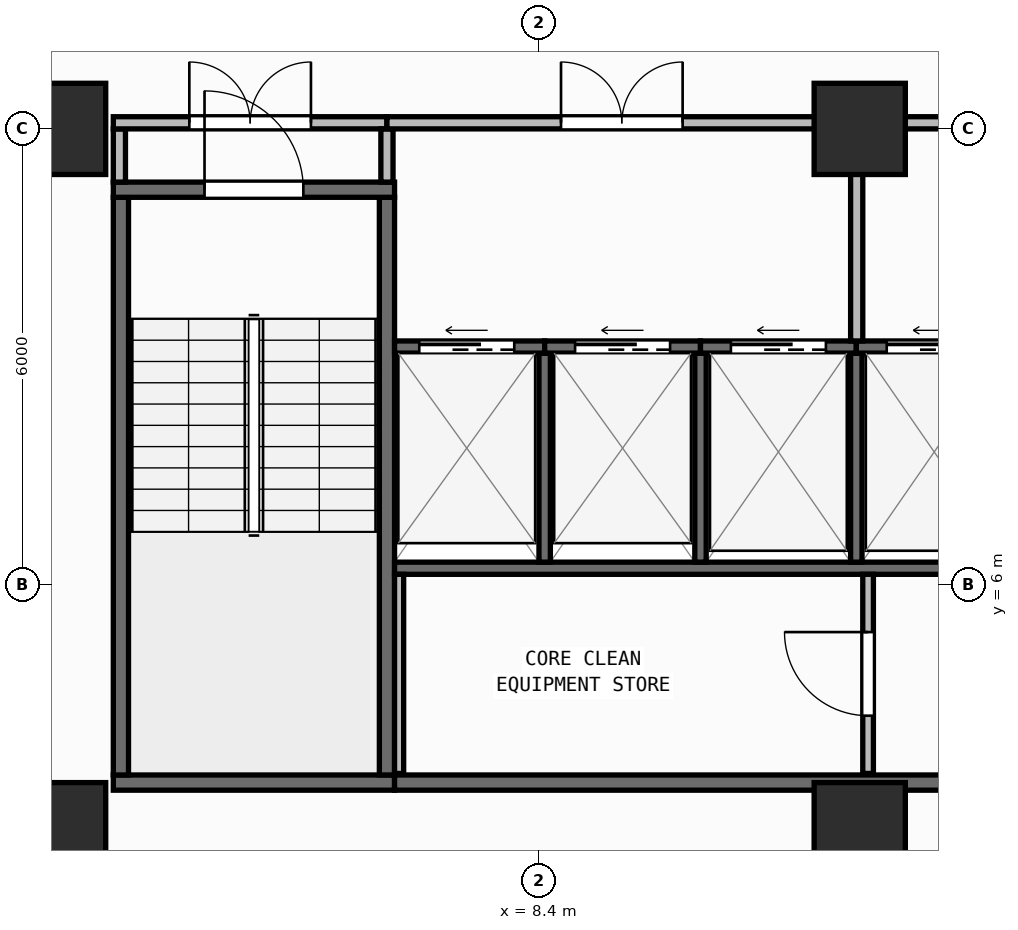
"""IFC4 building model, lengths in metres.
Left out: names, types, materials, properties, quantities, classifications, styles, units other than length and angle.
Written with IfcOpenShell. Run it as: python <this file> out.ifc"""

import sys

from ifc_helpers import new_model, si_unit, direction, frame, frame_2d, origin, origin_2d, place, context, subcontext, project, spatial, rectangle, extrude, element, fill, save


model = new_model("IFC4")
c1 = context("Model", 3, precision=1e-05, world=origin(), true_north=direction((0.0, 1.0)))
c2 = subcontext(c1, "Body", "Model", "MODEL_VIEW")
j1 = project(units=[si_unit("LENGTHUNIT", "METRE"), si_unit("PLANEANGLEUNIT", "RADIAN")], contexts=[c1])
p1 = place(None, origin())
s1 = spatial("IfcSite", under=j1, at=p1, CompositionType="ELEMENT")
p2 = place(p1, origin())
s2 = spatial("IfcBuilding", under=s1, at=p2, CompositionType="ELEMENT")
p3 = place(p2, frame((0.0, 0.0, 127.05)))
s3 = spatial("IfcBuildingStorey", under=s2, at=p3, CompositionType="ELEMENT", Elevation=127.05)
for number, where, z_axis, x_axis in (
    (1, (2.1, 2.8, 0.0), (0.0, 0.0, 1.0), (1.0, 0.0, 0.0)),
    (2, (12.62, 2.8, 0.0), (0.0, 0.0, 1.0), (1.0, 0.0, 0.0)),
    (3, (2.1, 12.0, 0.0), (0.0, 0.0, 1.0), (1.0, 0.0, 0.0)),
    (4, (12.62, 12.0, 0.0), (0.0, 0.0, 1.0), (1.0, 0.0, 0.0)),
):
    element("IfcColumn", number, at=place(p3, frame(where, z_axis=z_axis, x_axis=x_axis)), inside=s3, PredefinedType="COLUMN", context=c2, shape_type="SweptSolid", body=[
        extrude(rectangle(XDim=1.2, YDim=1.2, at=origin_2d()), origin(), (0.0, 0.0, 1.0), 3.95),
    ])
p4 = place(p3, frame((2.76, 0.173, 0.0), z_axis=(0.0, 0.0, 1.0), x_axis=(0.996857931723, 0.079210251617, 0.0)))
e5 = element("IfcWall", 5, at=p4, inside=s3, PredefinedType="STANDARD", context=c2, shape_type="SweptSolid", body=[
    extrude(rectangle(XDim=51.442, YDim=0.26, at=frame_2d((25.721, 0.0))), origin(), (0.0, 0.0, 1.0), 3.71),
])
p5 = place(p4, frame((24.521, 0.0, 0.9)))
e6 = element("IfcOpeningElement", 6, at=p5, cuts=e5, PredefinedType="OPENING", context=c2, shape_type="SweptSolid", body=[
    extrude(rectangle(XDim=2.4, YDim=1.65, at=frame_2d((1.2, 0.825))), frame((0.0, 0.14, 0.0), z_axis=(0.0, -1.0, 0.0), x_axis=(1.0, 0.0, 0.0)), (0.0, 0.0, 1.0), 0.28),
])
p6 = place(p3, frame((2.8, 3.4, 0.0), z_axis=(0.0, 0.0, 1.0), x_axis=(1.0, 0.0, 0.0)))
e7 = element("IfcWall", 7, at=p6, inside=s3, PredefinedType="SHEAR", context=c2, shape_type="SweptSolid", body=[
    extrude(rectangle(XDim=3.7, YDim=0.2, at=frame_2d((1.85, 0.0))), origin(), (0.0, 0.0, 1.0), 3.71),
])
for number, where, z_axis, x_axis in (
    (8, (2.9, 3.5, 0.0), (0.0, 0.0, 1.0), (0.0, 1.0, 0.0)),
    (9, (6.4, 3.5, 0.0), (0.0, 0.0, 1.0), (0.0, 1.0, 0.0)),
):
    element("IfcWall", number, at=place(p3, frame(where, z_axis=z_axis, x_axis=x_axis)), inside=s3, PredefinedType="SHEAR", context=c2, shape_type="SweptSolid", body=[
        extrude(rectangle(XDim=7.6, YDim=0.2, at=frame_2d((3.8, 0.0))), origin(), (0.0, 0.0, 1.0), 3.71),
    ])
p7 = place(p3, frame((2.8, 11.2, 0.0), z_axis=(0.0, 0.0, 1.0), x_axis=(1.0, 0.0, 0.0)))
e10 = element("IfcWall", 10, at=p7, inside=s3, PredefinedType="SHEAR", context=c2, shape_type="SweptSolid", body=[
    extrude(rectangle(XDim=3.7, YDim=0.2, at=frame_2d((1.85, 0.0))), origin(), (0.0, 0.0, 1.0), 3.71),
])
p8 = place(p7, frame((1.2, 0.0, 0.0)))
e11 = element("IfcOpeningElement", 11, at=p8, cuts=e10, PredefinedType="OPENING", context=c2, shape_type="SweptSolid", body=[
    extrude(rectangle(XDim=1.3, YDim=2.15, at=frame_2d((0.65, 1.075))), frame((0.0, 0.11, 0.0), z_axis=(0.0, -1.0, 0.0), x_axis=(1.0, 0.0, 0.0)), (0.0, 0.0, 1.0), 0.22),
])
p9 = place(p3, frame((6.5, 3.4, 0.0), z_axis=(0.0, 0.0, 1.0), x_axis=(1.0, 0.0, 0.0)))
e12 = element("IfcWall", 12, at=p9, inside=s3, PredefinedType="SHEAR", context=c2, shape_type="SweptSolid", body=[
    extrude(rectangle(XDim=13.7, YDim=0.2, at=frame_2d((6.85, 0.0))), origin(), (0.0, 0.0, 1.0), 3.71),
])
p10 = place(p3, frame((6.5, 6.22, 0.0), z_axis=(0.0, 0.0, 1.0), x_axis=(1.0, 0.0, 0.0)))
e13 = element("IfcWall", 13, at=p10, inside=s3, PredefinedType="SHEAR", context=c2, shape_type="SweptSolid", body=[
    extrude(rectangle(XDim=12.11, YDim=0.16, at=frame_2d((6.055, 0.0))), origin(), (0.0, 0.0, 1.0), 3.71),
])
for number, where, z_axis, x_axis in (
    (14, (8.475, 6.3, 0.0), (0.0, 0.0, 1.0), (0.0, 1.0, 0.0)),
    (15, (10.525, 6.3, 0.0), (0.0, 0.0, 1.0), (0.0, 1.0, 0.0)),
    (16, (12.575, 6.3, 0.0), (0.0, 0.0, 1.0), (0.0, 1.0, 0.0)),
):
    element("IfcWall", number, at=place(p3, frame(where, z_axis=z_axis, x_axis=x_axis)), inside=s3, PredefinedType="SHEAR", context=c2, shape_type="SweptSolid", body=[
        extrude(rectangle(XDim=2.75, YDim=0.15, at=frame_2d((1.375, 0.0))), origin(), (0.0, 0.0, 1.0), 3.71),
    ])
p11 = place(p3, frame((6.5, 9.13, 0.0), z_axis=(0.0, 0.0, 1.0), x_axis=(1.0, 0.0, 0.0)))
e17 = element("IfcWall", 17, at=p11, inside=s3, PredefinedType="SHEAR", context=c2, shape_type="SweptSolid", body=[
    extrude(rectangle(XDim=1.975, YDim=0.16, at=frame_2d((0.988, 0.0))), origin(), (0.0, 0.0, 1.0), 3.71),
])
p12 = place(p11, frame((0.325, 0.0, 0.0)))
e18 = element("IfcOpeningElement", 18, at=p12, cuts=e17, PredefinedType="OPENING", context=c2, shape_type="SweptSolid", body=[
    extrude(rectangle(XDim=1.25, YDim=2.15, at=frame_2d((0.625, 1.075))), frame((0.0, 0.09, 0.0), z_axis=(0.0, -1.0, 0.0), x_axis=(1.0, 0.0, 0.0)), (0.0, 0.0, 1.0), 0.18),
])
p13 = place(p3, frame((8.475, 9.13, 0.0), z_axis=(0.0, 0.0, 1.0), x_axis=(1.0, 0.0, 0.0)))
e19 = element("IfcWall", 19, at=p13, inside=s3, PredefinedType="SHEAR", context=c2, shape_type="SweptSolid", body=[
    extrude(rectangle(XDim=2.05, YDim=0.16, at=frame_2d((1.025, 0.0))), origin(), (0.0, 0.0, 1.0), 3.71),
])
p14 = place(p13, frame((0.4, 0.0, 0.0)))
e20 = element("IfcOpeningElement", 20, at=p14, cuts=e19, PredefinedType="OPENING", context=c2, shape_type="SweptSolid", body=[
    extrude(rectangle(XDim=1.25, YDim=2.15, at=frame_2d((0.625, 1.075))), frame((0.0, 0.09, 0.0), z_axis=(0.0, -1.0, 0.0), x_axis=(1.0, 0.0, 0.0)), (0.0, 0.0, 1.0), 0.18),
])
p15 = place(p3, frame((10.525, 9.13, 0.0), z_axis=(0.0, 0.0, 1.0), x_axis=(1.0, 0.0, 0.0)))
e21 = element("IfcWall", 21, at=p15, inside=s3, PredefinedType="SHEAR", context=c2, shape_type="SweptSolid", body=[
    extrude(rectangle(XDim=2.05, YDim=0.16, at=frame_2d((1.025, 0.0))), origin(), (0.0, 0.0, 1.0), 3.71),
])
p16 = place(p15, frame((0.4, 0.0, 0.0)))
e22 = element("IfcOpeningElement", 22, at=p16, cuts=e21, PredefinedType="OPENING", context=c2, shape_type="SweptSolid", body=[
    extrude(rectangle(XDim=1.25, YDim=2.15, at=frame_2d((0.625, 1.075))), frame((0.0, 0.09, 0.0), z_axis=(0.0, -1.0, 0.0), x_axis=(1.0, 0.0, 0.0)), (0.0, 0.0, 1.0), 0.18),
])
p17 = place(p3, frame((12.575, 9.13, 0.0), z_axis=(0.0, 0.0, 1.0), x_axis=(1.0, 0.0, 0.0)))
e23 = element("IfcWall", 23, at=p17, inside=s3, PredefinedType="SHEAR", context=c2, shape_type="SweptSolid", body=[
    extrude(rectangle(XDim=2.05, YDim=0.16, at=frame_2d((1.025, 0.0))), origin(), (0.0, 0.0, 1.0), 3.71),
])
p18 = place(p17, frame((0.4, 0.0, 0.0)))
e24 = element("IfcOpeningElement", 24, at=p18, cuts=e23, PredefinedType="OPENING", context=c2, shape_type="SweptSolid", body=[
    extrude(rectangle(XDim=1.25, YDim=2.15, at=frame_2d((0.625, 1.075))), frame((0.0, 0.09, 0.0), z_axis=(0.0, -1.0, 0.0), x_axis=(1.0, 0.0, 0.0)), (0.0, 0.0, 1.0), 0.18),
])
p19 = place(p3, frame((6.56, 3.52, 0.0), z_axis=(0.0, 0.0, 1.0), x_axis=(0.0, 1.0, 0.0)))
e25 = element("IfcWall", 25, at=p19, inside=s3, PredefinedType="PARTITIONING", context=c2, shape_type="SweptSolid", body=[
    extrude(rectangle(XDim=2.62, YDim=0.12, at=frame_2d((1.31, 0.0))), origin(), (0.0, 0.0, 1.0), 3.71),
])
p20 = place(p3, frame((12.73, 3.52, 0.0), z_axis=(0.0, 0.0, 1.0), x_axis=(0.0, 1.0, 0.0)))
e26 = element("IfcWall", 26, at=p20, inside=s3, PredefinedType="PARTITIONING", context=c2, shape_type="SweptSolid", body=[
    extrude(rectangle(XDim=2.62, YDim=0.14, at=frame_2d((1.31, 0.0))), origin(), (0.0, 0.0, 1.0), 3.71),
])
p21 = place(p20, frame((0.76, 0.0, 0.0)))
e27 = element("IfcOpeningElement", 27, at=p21, cuts=e26, PredefinedType="OPENING", context=c2, shape_type="SweptSolid", body=[
    extrude(rectangle(XDim=1.1, YDim=2.1, at=frame_2d((0.55, 1.05))), frame((0.0, 0.08, 0.0), z_axis=(0.0, -1.0, 0.0), x_axis=(1.0, 0.0, 0.0)), (0.0, 0.0, 1.0), 0.16),
])
p22 = place(p3, frame((2.88, 11.3, 0.0), z_axis=(0.0, 0.0, 1.0), x_axis=(0.0, 1.0, 0.0)))
e28 = element("IfcWall", 28, at=p22, inside=s3, PredefinedType="PARTITIONING", context=c2, shape_type="SweptSolid", body=[
    extrude(rectangle(XDim=0.7, YDim=0.16, at=frame_2d((0.35, 0.0))), origin(), (0.0, 0.0, 1.0), 3.71),
])
p23 = place(p3, frame((2.8, 12.08, 0.0), z_axis=(0.0, 0.0, 1.0), x_axis=(1.0, 0.0, 0.0)))
e29 = element("IfcWall", 29, at=p23, inside=s3, PredefinedType="PARTITIONING", context=c2, shape_type="SweptSolid", body=[
    extrude(rectangle(XDim=3.6, YDim=0.16, at=frame_2d((1.8, 0.0))), origin(), (0.0, 0.0, 1.0), 3.083),
])
p24 = place(p23, frame((1.0, 0.0, 0.0)))
e30 = element("IfcOpeningElement", 30, at=p24, cuts=e29, PredefinedType="OPENING", context=c2, shape_type="SweptSolid", body=[
    extrude(rectangle(XDim=1.6, YDim=2.05, at=frame_2d((0.8, 1.025))), frame((0.0, 0.09, 0.0), z_axis=(0.0, -1.0, 0.0), x_axis=(1.0, 0.0, 0.0)), (0.0, 0.0, 1.0), 0.18),
])
p25 = place(p3, frame((6.4, 11.3, 0.0), z_axis=(0.0, 0.0, 1.0), x_axis=(0.0, 1.0, 0.0)))
e31 = element("IfcWall", 31, at=p25, inside=s3, PredefinedType="PARTITIONING", context=c2, shape_type="SweptSolid", body=[
    extrude(rectangle(XDim=0.7, YDim=0.16, at=frame_2d((0.35, 0.0))), origin(), (0.0, 0.0, 1.0), 3.71),
])
p26 = place(p3, frame((6.4, 12.08, 0.0), z_axis=(0.0, 0.0, 1.0), x_axis=(1.0, 0.0, 0.0)))
e32 = element("IfcWall", 32, at=p26, inside=s3, PredefinedType="PARTITIONING", context=c2, shape_type="SweptSolid", body=[
    extrude(rectangle(XDim=6.18, YDim=0.16, at=frame_2d((3.09, 0.0))), origin(), (0.0, 0.0, 1.0), 3.083),
])
p27 = place(p26, frame((2.29, 0.0, 0.0)))
e33 = element("IfcOpeningElement", 33, at=p27, cuts=e32, PredefinedType="OPENING", context=c2, shape_type="SweptSolid", body=[
    extrude(rectangle(XDim=1.6, YDim=2.05, at=frame_2d((0.8, 1.025))), frame((0.0, 0.09, 0.0), z_axis=(0.0, -1.0, 0.0), x_axis=(1.0, 0.0, 0.0)), (0.0, 0.0, 1.0), 0.18),
])
p28 = place(p3, frame((12.58, 9.21, 0.0), z_axis=(0.0, 0.0, 1.0), x_axis=(0.0, 1.0, 0.0)))
e34 = element("IfcWall", 34, at=p28, inside=s3, PredefinedType="PARTITIONING", context=c2, shape_type="SweptSolid", body=[
    extrude(rectangle(XDim=2.79, YDim=0.16, at=frame_2d((1.395, 0.0))), origin(), (0.0, 0.0, 1.0), 3.71),
])
p29 = place(p3, frame((12.58, 12.08, 0.0), z_axis=(0.0, 0.0, 1.0), x_axis=(1.0, 0.0, 0.0)))
e35 = element("IfcWall", 35, at=p29, inside=s3, PredefinedType="PARTITIONING", context=c2, shape_type="SweptSolid", body=[
    extrude(rectangle(XDim=7.7, YDim=0.16, at=frame_2d((3.85, 0.0))), origin(), (0.0, 0.0, 1.0), 3.083),
])
p30 = place(p29, frame((3.05, 0.0, 0.0)))
e36 = element("IfcOpeningElement", 36, at=p30, cuts=e35, PredefinedType="OPENING", context=c2, shape_type="SweptSolid", body=[
    extrude(rectangle(XDim=1.6, YDim=2.05, at=frame_2d((0.8, 1.025))), frame((0.0, 0.09, 0.0), z_axis=(0.0, -1.0, 0.0), x_axis=(1.0, 0.0, 0.0)), (0.0, 0.0, 1.0), 0.18),
])
p31 = place(p8, origin())
e37 = element("IfcDoor", 37, at=p31, inside=s3, OperationType="SINGLE_SWING_LEFT", PredefinedType="DOOR", context=c2, shape_type="SweptSolid", body=[
    extrude(rectangle(XDim=1.3, YDim=2.15, at=frame_2d((0.65, 1.075))), frame((0.0, 0.025, 0.0), z_axis=(0.0, -1.0, 0.0), x_axis=(1.0, 0.0, 0.0)), (0.0, 0.0, 1.0), 0.05),
])
fill(e11, e37)
p32 = place(p12, origin())
e38 = element("IfcDoor", 38, at=p32, inside=s3, OperationType="SLIDING_TO_LEFT", PredefinedType="DOOR", context=c2, shape_type="SweptSolid", body=[
    extrude(rectangle(XDim=1.25, YDim=2.15, at=frame_2d((0.625, 1.075))), frame((0.0, 0.025, 0.0), z_axis=(0.0, -1.0, 0.0), x_axis=(1.0, 0.0, 0.0)), (0.0, 0.0, 1.0), 0.05),
])
fill(e18, e38)
p33 = place(p14, origin())
e39 = element("IfcDoor", 39, at=p33, inside=s3, OperationType="SLIDING_TO_LEFT", PredefinedType="DOOR", context=c2, shape_type="SweptSolid", body=[
    extrude(rectangle(XDim=1.25, YDim=2.15, at=frame_2d((0.625, 1.075))), frame((0.0, 0.025, 0.0), z_axis=(0.0, -1.0, 0.0), x_axis=(1.0, 0.0, 0.0)), (0.0, 0.0, 1.0), 0.05),
])
fill(e20, e39)
p34 = place(p16, origin())
e40 = element("IfcDoor", 40, at=p34, inside=s3, OperationType="SLIDING_TO_LEFT", PredefinedType="DOOR", context=c2, shape_type="SweptSolid", body=[
    extrude(rectangle(XDim=1.25, YDim=2.15, at=frame_2d((0.625, 1.075))), frame((0.0, 0.025, 0.0), z_axis=(0.0, -1.0, 0.0), x_axis=(1.0, 0.0, 0.0)), (0.0, 0.0, 1.0), 0.05),
])
fill(e22, e40)
p35 = place(p18, origin())
e41 = element("IfcDoor", 41, at=p35, inside=s3, OperationType="SLIDING_TO_LEFT", PredefinedType="DOOR", context=c2, shape_type="SweptSolid", body=[
    extrude(rectangle(XDim=1.25, YDim=2.15, at=frame_2d((0.625, 1.075))), frame((0.0, 0.025, 0.0), z_axis=(0.0, -1.0, 0.0), x_axis=(1.0, 0.0, 0.0)), (0.0, 0.0, 1.0), 0.05),
])
fill(e24, e41)
p36 = place(p21, origin())
e42 = element("IfcDoor", 42, at=p36, inside=s3, OperationType="SINGLE_SWING_RIGHT", PredefinedType="DOOR", context=c2, shape_type="SweptSolid", body=[
    extrude(rectangle(XDim=1.1, YDim=2.1, at=frame_2d((0.55, 1.05))), frame((0.0, 0.025, 0.0), z_axis=(0.0, -1.0, 0.0), x_axis=(1.0, 0.0, 0.0)), (0.0, 0.0, 1.0), 0.05),
])
fill(e27, e42)
p37 = place(p24, origin())
e43 = element("IfcDoor", 43, at=p37, inside=s3, OperationType="DOUBLE_DOOR_SINGLE_SWING", PredefinedType="DOOR", context=c2, shape_type="SweptSolid", body=[
    extrude(rectangle(XDim=1.6, YDim=2.05, at=frame_2d((0.8, 1.025))), frame((0.0, 0.025, 0.0), z_axis=(0.0, -1.0, 0.0), x_axis=(1.0, 0.0, 0.0)), (0.0, 0.0, 1.0), 0.05),
])
fill(e30, e43)
p38 = place(p27, origin())
e44 = element("IfcDoor", 44, at=p38, inside=s3, OperationType="DOUBLE_DOOR_SINGLE_SWING", PredefinedType="DOOR", context=c2, shape_type="SweptSolid", body=[
    extrude(rectangle(XDim=1.6, YDim=2.05, at=frame_2d((0.8, 1.025))), frame((0.0, 0.025, 0.0), z_axis=(0.0, -1.0, 0.0), x_axis=(1.0, 0.0, 0.0)), (0.0, 0.0, 1.0), 0.05),
])
fill(e33, e44)
save(model, sys.argv[1])
